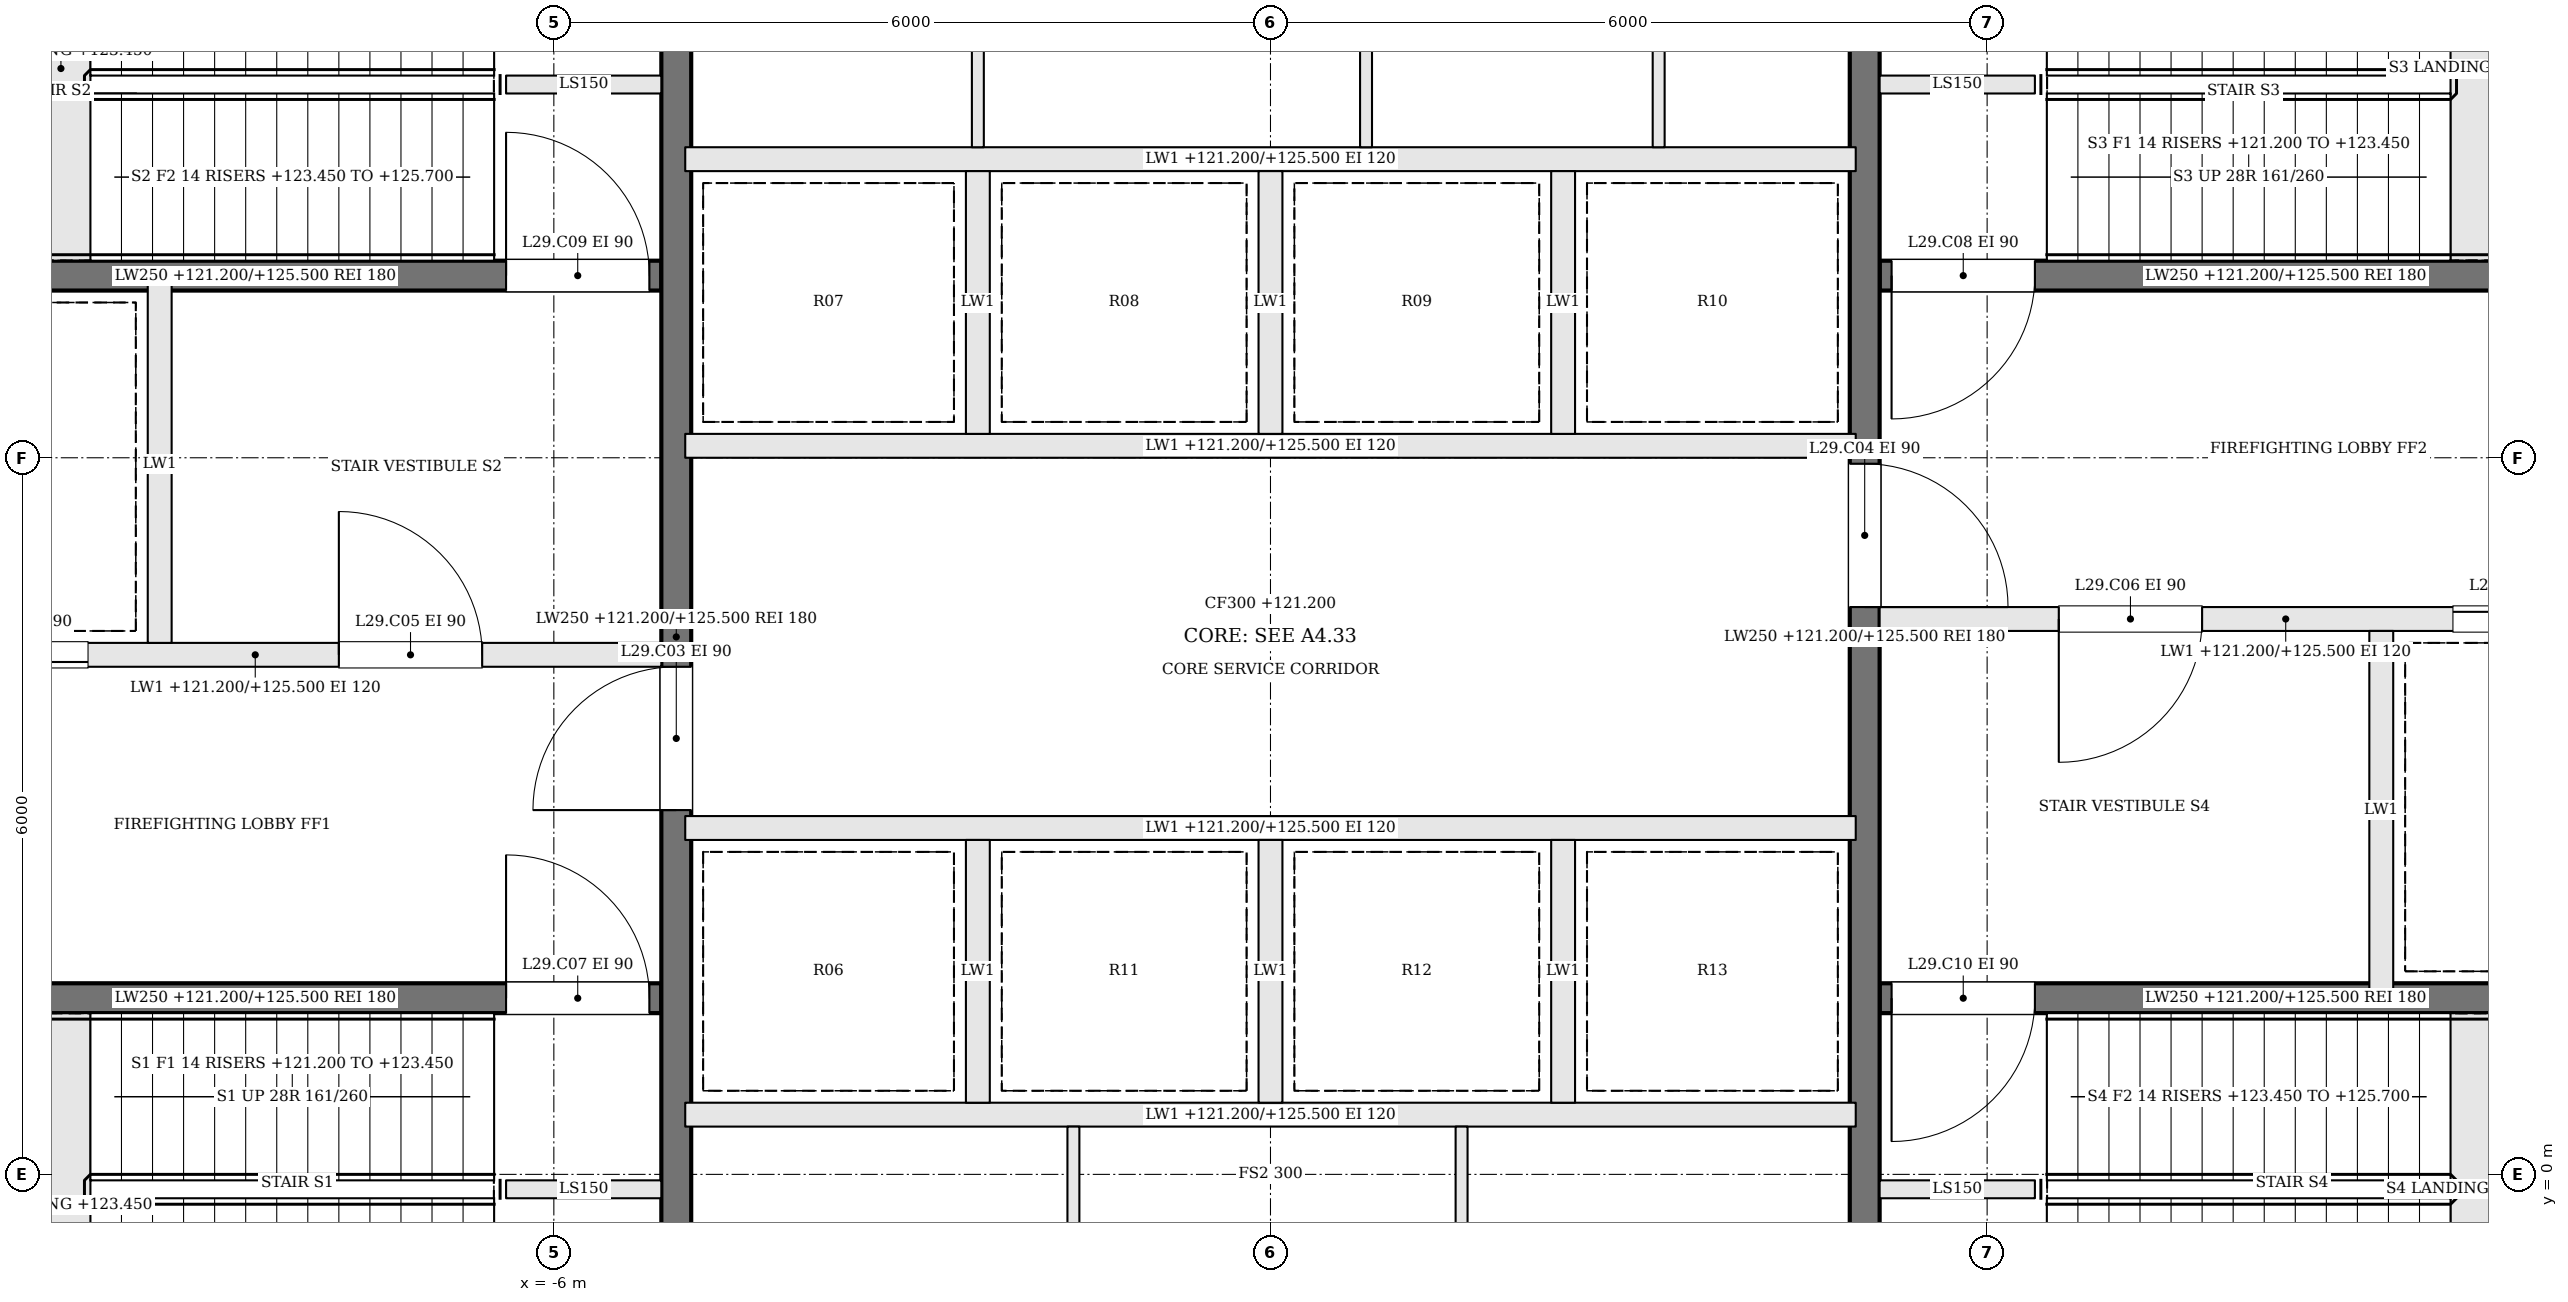
"""IFC4 building model, lengths in metres.
Left out: names, types, materials, properties, quantities, classifications, styles, units other than length and angle.
Written with IfcOpenShell. Run it as: python <this file> out.ifc"""

import sys

from ifc_helpers import new_model, si_unit, direction, frame, frame_2d, origin, place, context, subcontext, project, spatial, rectangle, extrude, element, fill, save


model = new_model("IFC4")
c1 = context("Model", 3, precision=1e-05, world=origin(), true_north=direction((0.0, 1.0)))
c2 = subcontext(c1, "Body", "Model", "MODEL_VIEW")
j1 = project(units=[si_unit("LENGTHUNIT", "METRE"), si_unit("PLANEANGLEUNIT", "RADIAN")], contexts=[c1])
p1 = place(None, origin())
s1 = spatial("IfcSite", under=j1, at=p1, CompositionType="ELEMENT")
p2 = place(p1, origin())
s2 = spatial("IfcBuilding", under=s1, at=p2, CompositionType="ELEMENT")
p3 = place(p2, frame((0.0, 0.0, 121.2)))
s3 = spatial("IfcBuildingStorey", under=s2, at=p3, CompositionType="ELEMENT", Elevation=121.2)
for number, where, z_axis, x_axis in (
    (1, (-6.4, -0.125, 0.0), (0.0, 0.0, 1.0), (1.0, 0.0, 0.0)),
    (2, (6.4, 9.125, 0.0), (0.0, 0.0, 1.0), (-1.0, 0.0, 0.0)),
    (3, (-6.4, 9.125, 0.0), (0.0, 0.0, 1.0), (1.0, 0.0, 0.0)),
    (4, (6.4, -0.125, 0.0), (0.0, 0.0, 1.0), (-1.0, 0.0, 0.0)),
):
    element("IfcWall", number, at=place(p3, frame(where, z_axis=z_axis, x_axis=x_axis)), inside=s3, PredefinedType="SOLIDWALL", context=c2, shape_type="SweptSolid", body=[
        extrude(rectangle(XDim=1.3, YDim=0.15, at=frame_2d((0.65, 0.0))), origin(), (0.0, 0.0, 1.0), 4.3),
    ])
p4 = place(p3, frame((-11.9, 1.475, 0.0), z_axis=(0.0, 0.0, 1.0), x_axis=(1.0, 0.0, 0.0)))
e5 = element("IfcWall", 5, at=p4, inside=s3, PredefinedType="SOLIDWALL", context=c2, shape_type="SweptSolid", body=[
    extrude(rectangle(XDim=6.8, YDim=0.25, at=frame_2d((3.4, 0.0))), origin(), (0.0, 0.0, 1.0), 4.3),
])
p5 = place(p4, frame((5.5, 0.0, 0.0)))
e6 = element("IfcOpeningElement", 6, at=p5, cuts=e5, PredefinedType="OPENING", context=c2, shape_type="SweptSolid", body=[
    extrude(rectangle(XDim=1.2, YDim=2.1, at=frame_2d((0.6, 1.05))), frame((0.0, 0.135, 0.0), z_axis=(0.0, -1.0, 0.0), x_axis=(1.0, 0.0, 0.0)), (0.0, 0.0, 1.0), 0.27),
])
p6 = place(p3, frame((11.9, 7.525, 0.0), z_axis=(0.0, 0.0, 1.0), x_axis=(-1.0, 0.0, 0.0)))
e7 = element("IfcWall", 7, at=p6, inside=s3, PredefinedType="SOLIDWALL", context=c2, shape_type="SweptSolid", body=[
    extrude(rectangle(XDim=6.8, YDim=0.25, at=frame_2d((3.4, 0.0))), origin(), (0.0, 0.0, 1.0), 4.3),
])
p7 = place(p6, frame((5.5, 0.0, 0.0)))
e8 = element("IfcOpeningElement", 8, at=p7, cuts=e7, PredefinedType="OPENING", context=c2, shape_type="SweptSolid", body=[
    extrude(rectangle(XDim=1.2, YDim=2.1, at=frame_2d((0.6, 1.05))), frame((0.0, 0.135, 0.0), z_axis=(0.0, -1.0, 0.0), x_axis=(1.0, 0.0, 0.0)), (0.0, 0.0, 1.0), 0.27),
])
p8 = place(p3, frame((-11.9, 4.35, 0.0), z_axis=(0.0, 0.0, 1.0), x_axis=(1.0, 0.0, 0.0)))
e9 = element("IfcWall", 9, at=p8, inside=s3, PredefinedType="SOLIDWALL", context=c2, shape_type="SweptSolid", body=[
    extrude(rectangle(XDim=6.8, YDim=0.2, at=frame_2d((3.4, 0.0))), origin(), (0.0, 0.0, 1.0), 4.3),
])
p9 = place(p8, frame((4.1, 0.0, 0.0)))
e10 = element("IfcOpeningElement", 10, at=p9, cuts=e9, PredefinedType="OPENING", context=c2, shape_type="SweptSolid", body=[
    extrude(rectangle(XDim=1.2, YDim=2.1, at=frame_2d((0.6, 1.05))), frame((0.0, 0.11, 0.0), z_axis=(0.0, -1.0, 0.0), x_axis=(1.0, 0.0, 0.0)), (0.0, 0.0, 1.0), 0.22),
])
p10 = place(p8, frame((0.8, 0.0, 0.0)))
e11 = element("IfcOpeningElement", 11, at=p10, cuts=e9, PredefinedType="OPENING", context=c2, shape_type="SweptSolid", body=[
    extrude(rectangle(XDim=1.2, YDim=2.1, at=frame_2d((0.6, 1.05))), frame((0.0, 0.11, 0.0), z_axis=(0.0, -1.0, 0.0), x_axis=(1.0, 0.0, 0.0)), (0.0, 0.0, 1.0), 0.22),
])
p11 = place(p3, frame((11.9, 4.65, 0.0), z_axis=(0.0, 0.0, 1.0), x_axis=(-1.0, 0.0, 0.0)))
e12 = element("IfcWall", 12, at=p11, inside=s3, PredefinedType="SOLIDWALL", context=c2, shape_type="SweptSolid", body=[
    extrude(rectangle(XDim=6.8, YDim=0.2, at=frame_2d((3.4, 0.0))), origin(), (0.0, 0.0, 1.0), 4.3),
])
p12 = place(p11, frame((4.1, 0.0, 0.0)))
e13 = element("IfcOpeningElement", 13, at=p12, cuts=e12, PredefinedType="OPENING", context=c2, shape_type="SweptSolid", body=[
    extrude(rectangle(XDim=1.2, YDim=2.1, at=frame_2d((0.6, 1.05))), frame((0.0, 0.11, 0.0), z_axis=(0.0, -1.0, 0.0), x_axis=(1.0, 0.0, 0.0)), (0.0, 0.0, 1.0), 0.22),
])
p13 = place(p11, frame((0.8, 0.0, 0.0)))
e14 = element("IfcOpeningElement", 14, at=p13, cuts=e12, PredefinedType="OPENING", context=c2, shape_type="SweptSolid", body=[
    extrude(rectangle(XDim=1.2, YDim=2.1, at=frame_2d((0.6, 1.05))), frame((0.0, 0.11, 0.0), z_axis=(0.0, -1.0, 0.0), x_axis=(1.0, 0.0, 0.0)), (0.0, 0.0, 1.0), 0.22),
])
p14 = place(p3, frame((-11.9, 7.525, 0.0), z_axis=(0.0, 0.0, 1.0), x_axis=(1.0, 0.0, 0.0)))
e15 = element("IfcWall", 15, at=p14, inside=s3, PredefinedType="SOLIDWALL", context=c2, shape_type="SweptSolid", body=[
    extrude(rectangle(XDim=6.8, YDim=0.25, at=frame_2d((3.4, 0.0))), origin(), (0.0, 0.0, 1.0), 4.3),
])
p15 = place(p14, frame((5.5, 0.0, 0.0)))
e16 = element("IfcOpeningElement", 16, at=p15, cuts=e15, PredefinedType="OPENING", context=c2, shape_type="SweptSolid", body=[
    extrude(rectangle(XDim=1.2, YDim=2.1, at=frame_2d((0.6, 1.05))), frame((0.0, 0.135, 0.0), z_axis=(0.0, -1.0, 0.0), x_axis=(1.0, 0.0, 0.0)), (0.0, 0.0, 1.0), 0.27),
])
p16 = place(p3, frame((11.9, 1.475, 0.0), z_axis=(0.0, 0.0, 1.0), x_axis=(-1.0, 0.0, 0.0)))
e17 = element("IfcWall", 17, at=p16, inside=s3, PredefinedType="SOLIDWALL", context=c2, shape_type="SweptSolid", body=[
    extrude(rectangle(XDim=6.8, YDim=0.25, at=frame_2d((3.4, 0.0))), origin(), (0.0, 0.0, 1.0), 4.3),
])
p17 = place(p16, frame((5.5, 0.0, 0.0)))
e18 = element("IfcOpeningElement", 18, at=p17, cuts=e17, PredefinedType="OPENING", context=c2, shape_type="SweptSolid", body=[
    extrude(rectangle(XDim=1.2, YDim=2.1, at=frame_2d((0.6, 1.05))), frame((0.0, 0.135, 0.0), z_axis=(0.0, -1.0, 0.0), x_axis=(1.0, 0.0, 0.0)), (0.0, 0.0, 1.0), 0.27),
])
for number, where, z_axis, x_axis in (
    (19, (-9.3, 4.45, 0.0), (0.0, 0.0, 1.0), (0.0, 1.0, 0.0)),
    (20, (9.3, 4.55, 0.0), (0.0, 0.0, 1.0), (0.0, -1.0, 0.0)),
):
    element("IfcWall", number, at=place(p3, frame(where, z_axis=z_axis, x_axis=x_axis)), inside=s3, PredefinedType="SOLIDWALL", context=c2, shape_type="SweptSolid", body=[
        extrude(rectangle(XDim=3.0, YDim=0.2, at=frame_2d((1.5, 0.0))), origin(), (0.0, 0.0, 1.0), 4.3),
    ])
p18 = place(p3, frame((-4.975, -1.9, 0.0), z_axis=(0.0, 0.0, 1.0), x_axis=(0.0, 1.0, 0.0)))
e21 = element("IfcWall", 21, at=p18, inside=s3, PredefinedType="SOLIDWALL", context=c2, shape_type="SweptSolid", body=[
    extrude(rectangle(XDim=12.8, YDim=0.25, at=frame_2d((6.4, 0.0))), origin(), (0.0, 0.0, 1.0), 4.3),
])
p19 = place(p18, frame((4.95, 0.0, 0.0)))
e22 = element("IfcOpeningElement", 22, at=p19, cuts=e21, PredefinedType="OPENING", context=c2, shape_type="SweptSolid", body=[
    extrude(rectangle(XDim=1.2, YDim=2.1, at=frame_2d((0.6, 1.05))), frame((0.0, 0.135, 0.0), z_axis=(0.0, -1.0, 0.0), x_axis=(1.0, 0.0, 0.0)), (0.0, 0.0, 1.0), 0.27),
])
p20 = place(p3, frame((4.975, 10.9, 0.0), z_axis=(0.0, 0.0, 1.0), x_axis=(0.0, -1.0, 0.0)))
e23 = element("IfcWall", 23, at=p20, inside=s3, PredefinedType="SOLIDWALL", context=c2, shape_type="SweptSolid", body=[
    extrude(rectangle(XDim=12.8, YDim=0.25, at=frame_2d((6.4, 0.0))), origin(), (0.0, 0.0, 1.0), 4.3),
])
p21 = place(p20, frame((4.95, 0.0, 0.0)))
e24 = element("IfcOpeningElement", 24, at=p21, cuts=e23, PredefinedType="OPENING", context=c2, shape_type="SweptSolid", body=[
    extrude(rectangle(XDim=1.2, YDim=2.1, at=frame_2d((0.6, 1.05))), frame((0.0, 0.135, 0.0), z_axis=(0.0, -1.0, 0.0), x_axis=(1.0, 0.0, 0.0)), (0.0, 0.0, 1.0), 0.27),
])
for number, where, z_axis, x_axis in (
    (25, (-4.9, 0.5, 0.0), (0.0, 0.0, 1.0), (1.0, 0.0, 0.0)),
    (26, (-4.9, 2.9, 0.0), (0.0, 0.0, 1.0), (1.0, 0.0, 0.0)),
    (27, (-4.9, 6.1, 0.0), (0.0, 0.0, 1.0), (1.0, 0.0, 0.0)),
    (28, (-4.9, 8.5, 0.0), (0.0, 0.0, 1.0), (1.0, 0.0, 0.0)),
):
    element("IfcWall", number, at=place(p3, frame(where, z_axis=z_axis, x_axis=x_axis)), inside=s3, PredefinedType="SOLIDWALL", context=c2, shape_type="SweptSolid", body=[
        extrude(rectangle(XDim=9.8, YDim=0.2, at=frame_2d((4.9, 0.0))), origin(), (0.0, 0.0, 1.0), 4.3),
    ])
for number, where, z_axis, x_axis in (
    (29, (-2.45, 0.6, 0.0), (0.0, 0.0, 1.0), (0.0, 1.0, 0.0)),
    (30, (0.0, 0.6, 0.0), (0.0, 0.0, 1.0), (0.0, 1.0, 0.0)),
    (31, (2.45, 0.6, 0.0), (0.0, 0.0, 1.0), (0.0, 1.0, 0.0)),
    (32, (-2.45, 6.2, 0.0), (0.0, 0.0, 1.0), (0.0, 1.0, 0.0)),
    (33, (0.0, 6.2, 0.0), (0.0, 0.0, 1.0), (0.0, 1.0, 0.0)),
    (34, (2.45, 6.2, 0.0), (0.0, 0.0, 1.0), (0.0, 1.0, 0.0)),
):
    element("IfcWall", number, at=place(p3, frame(where, z_axis=z_axis, x_axis=x_axis)), inside=s3, PredefinedType="SOLIDWALL", context=c2, shape_type="SweptSolid", body=[
        extrude(rectangle(XDim=2.2, YDim=0.2, at=frame_2d((1.1, 0.0))), origin(), (0.0, 0.0, 1.0), 4.3),
    ])
for number, where, z_axis, x_axis in (
    (35, (-1.65, -1.9, 0.0), (0.0, 0.0, 1.0), (0.0, 1.0, 0.0)),
    (36, (1.6, -1.9, 0.0), (0.0, 0.0, 1.0), (0.0, 1.0, 0.0)),
    (37, (-2.45, 8.6, 0.0), (0.0, 0.0, 1.0), (0.0, 1.0, 0.0)),
    (38, (0.8, 8.6, 0.0), (0.0, 0.0, 1.0), (0.0, 1.0, 0.0)),
    (39, (3.25, 8.6, 0.0), (0.0, 0.0, 1.0), (0.0, 1.0, 0.0)),
):
    element("IfcWall", number, at=place(p3, frame(where, z_axis=z_axis, x_axis=x_axis)), inside=s3, PredefinedType="PARTITIONING", context=c2, shape_type="SweptSolid", body=[
        extrude(rectangle(XDim=2.3, YDim=0.1, at=frame_2d((1.15, 0.0))), origin(), (0.0, 0.0, 1.0), 4.3),
    ])
p22 = place(p19, origin())
e40 = element("IfcDoor", 40, at=p22, inside=s3, OperationType="SINGLE_SWING_LEFT", PredefinedType="DOOR", context=c2, shape_type="SweptSolid", body=[
    extrude(rectangle(XDim=1.2, YDim=2.1, at=frame_2d((0.6, 1.05))), frame((0.0, 0.025, 0.0), z_axis=(0.0, -1.0, 0.0), x_axis=(1.0, 0.0, 0.0)), (0.0, 0.0, 1.0), 0.05),
])
fill(e22, e40)
p23 = place(p21, origin())
e41 = element("IfcDoor", 41, at=p23, inside=s3, OperationType="SINGLE_SWING_RIGHT", PredefinedType="DOOR", context=c2, shape_type="SweptSolid", body=[
    extrude(rectangle(XDim=1.2, YDim=2.1, at=frame_2d((0.6, 1.05))), frame((0.0, 0.025, 0.0), z_axis=(0.0, -1.0, 0.0), x_axis=(1.0, 0.0, 0.0)), (0.0, 0.0, 1.0), 0.05),
])
fill(e24, e41)
p24 = place(p9, origin())
e42 = element("IfcDoor", 42, at=p24, inside=s3, OperationType="SINGLE_SWING_LEFT", PredefinedType="DOOR", context=c2, shape_type="SweptSolid", body=[
    extrude(rectangle(XDim=1.2, YDim=2.1, at=frame_2d((0.6, 1.05))), frame((0.0, 0.025, 0.0), z_axis=(0.0, -1.0, 0.0), x_axis=(1.0, 0.0, 0.0)), (0.0, 0.0, 1.0), 0.05),
])
fill(e10, e42)
p25 = place(p12, origin())
e43 = element("IfcDoor", 43, at=p25, inside=s3, OperationType="SINGLE_SWING_RIGHT", PredefinedType="DOOR", context=c2, shape_type="SweptSolid", body=[
    extrude(rectangle(XDim=1.2, YDim=2.1, at=frame_2d((0.6, 1.05))), frame((0.0, 0.025, 0.0), z_axis=(0.0, -1.0, 0.0), x_axis=(1.0, 0.0, 0.0)), (0.0, 0.0, 1.0), 0.05),
])
fill(e13, e43)
p26 = place(p5, origin())
e44 = element("IfcDoor", 44, at=p26, inside=s3, OperationType="SINGLE_SWING_LEFT", PredefinedType="DOOR", context=c2, shape_type="SweptSolid", body=[
    extrude(rectangle(XDim=1.2, YDim=2.1, at=frame_2d((0.6, 1.05))), frame((0.0, 0.025, 0.0), z_axis=(0.0, -1.0, 0.0), x_axis=(1.0, 0.0, 0.0)), (0.0, 0.0, 1.0), 0.05),
])
fill(e6, e44)
p27 = place(p7, origin())
e45 = element("IfcDoor", 45, at=p27, inside=s3, OperationType="SINGLE_SWING_RIGHT", PredefinedType="DOOR", context=c2, shape_type="SweptSolid", body=[
    extrude(rectangle(XDim=1.2, YDim=2.1, at=frame_2d((0.6, 1.05))), frame((0.0, 0.025, 0.0), z_axis=(0.0, -1.0, 0.0), x_axis=(1.0, 0.0, 0.0)), (0.0, 0.0, 1.0), 0.05),
])
fill(e8, e45)
p28 = place(p15, origin())
e46 = element("IfcDoor", 46, at=p28, inside=s3, OperationType="SINGLE_SWING_LEFT", PredefinedType="DOOR", context=c2, shape_type="SweptSolid", body=[
    extrude(rectangle(XDim=1.2, YDim=2.1, at=frame_2d((0.6, 1.05))), frame((0.0, 0.025, 0.0), z_axis=(0.0, -1.0, 0.0), x_axis=(1.0, 0.0, 0.0)), (0.0, 0.0, 1.0), 0.05),
])
fill(e16, e46)
p29 = place(p17, origin())
e47 = element("IfcDoor", 47, at=p29, inside=s3, OperationType="SINGLE_SWING_RIGHT", PredefinedType="DOOR", context=c2, shape_type="SweptSolid", body=[
    extrude(rectangle(XDim=1.2, YDim=2.1, at=frame_2d((0.6, 1.05))), frame((0.0, 0.025, 0.0), z_axis=(0.0, -1.0, 0.0), x_axis=(1.0, 0.0, 0.0)), (0.0, 0.0, 1.0), 0.05),
])
fill(e18, e47)
p30 = place(p10, origin())
e48 = element("IfcDoor", 48, at=p30, inside=s3, OperationType="SLIDING_TO_RIGHT", PredefinedType="DOOR", context=c2, shape_type="SweptSolid", body=[
    extrude(rectangle(XDim=1.2, YDim=2.1, at=frame_2d((0.6, 1.05))), frame((0.0, 0.025, 0.0), z_axis=(0.0, -1.0, 0.0), x_axis=(1.0, 0.0, 0.0)), (0.0, 0.0, 1.0), 0.05),
])
fill(e11, e48)
p31 = place(p13, origin())
e49 = element("IfcDoor", 49, at=p31, inside=s3, OperationType="SLIDING_TO_RIGHT", PredefinedType="DOOR", context=c2, shape_type="SweptSolid", body=[
    extrude(rectangle(XDim=1.2, YDim=2.1, at=frame_2d((0.6, 1.05))), frame((0.0, 0.025, 0.0), z_axis=(0.0, -1.0, 0.0), x_axis=(1.0, 0.0, 0.0)), (0.0, 0.0, 1.0), 0.05),
])
fill(e14, e49)
save(model, sys.argv[1])
